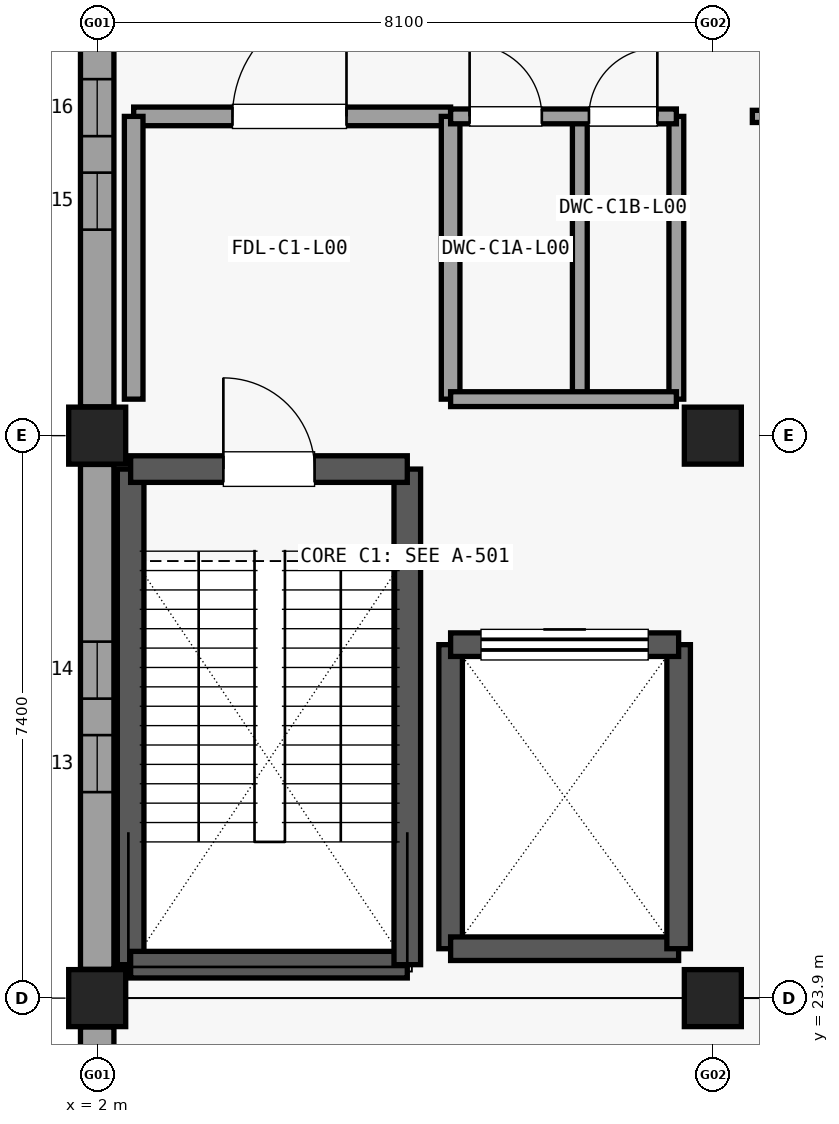
"""IFC4 building model, lengths in metres.
Left out: names, types, materials, properties, quantities, classifications, styles, units other than length and angle.
Written with IfcOpenShell. Run it as: python <this file> out.ifc"""

import sys

from ifc_helpers import new_model, si_unit, direction, frame, frame_2d, origin, origin_2d, place, context, subcontext, project, spatial, rectangle, extrude, element, fill, save


model = new_model("IFC4")
c1 = context("Model", 3, precision=1e-05, world=origin(), true_north=direction((0.0, 1.0)))
c2 = subcontext(c1, "Body", "Model", "MODEL_VIEW")
j1 = project(units=[si_unit("LENGTHUNIT", "METRE"), si_unit("PLANEANGLEUNIT", "RADIAN")], contexts=[c1])
p1 = place(None, origin())
s1 = spatial("IfcSite", under=j1, at=p1, CompositionType="ELEMENT")
p2 = place(p1, origin())
s2 = spatial("IfcBuilding", under=s1, at=p2, CompositionType="ELEMENT")
p3 = place(p2, origin())
s3 = spatial("IfcBuildingStorey", under=s2, at=p3, CompositionType="ELEMENT", Elevation=0.0)
for number, where, z_axis, x_axis in (
    (1, (2.0, 23.9, 0.0), (0.0, 0.0, 1.0), (1.0, 0.0, 0.0)),
    (2, (2.0, 31.3, 0.0), (0.0, 0.0, 1.0), (1.0, 0.0, 0.0)),
    (3, (10.1, 23.9, 0.0), (0.0, 0.0, 1.0), (1.0, 0.0, 0.0)),
    (4, (10.1, 31.3, 0.0), (0.0, 0.0, 1.0), (1.0, 0.0, 0.0)),
):
    element("IfcColumn", number, at=place(p3, frame(where, z_axis=z_axis, x_axis=x_axis)), inside=s3, PredefinedType="COLUMN", context=c2, shape_type="SweptSolid", body=[
        extrude(rectangle(XDim=0.75, YDim=0.75, at=origin_2d()), origin(), (0.0, 0.0, 1.0), 5.135),
    ])
p4 = place(p3, frame((2.0, 16.879, 0.0), z_axis=(0.0, 0.0, 1.0), x_axis=(0.0, 1.0, 0.0)))
e5 = element("IfcWall", 5, at=p4, inside=s3, PredefinedType="SOLIDWALL", context=c2, shape_type="SweptSolid", body=[
    extrude(rectangle(XDim=6.642, YDim=0.44, at=frame_2d((3.321, 0.0))), origin(), (0.0, 0.0, 1.0), 4.27),
])
p5 = place(p4, frame((2.331, 0.0, 0.65)))
e6 = element("IfcOpeningElement", 6, at=p5, cuts=e5, PredefinedType="OPENING", context=c2, shape_type="SweptSolid", body=[
    extrude(rectangle(XDim=0.75, YDim=3.1, at=frame_2d((0.375, 1.55))), frame((0.0, 0.23, 0.0), z_axis=(0.0, -1.0, 0.0), x_axis=(1.0, 0.0, 0.0)), (0.0, 0.0, 1.0), 0.46),
])
p6 = place(p4, frame((3.561, 0.0, 0.65)))
e7 = element("IfcOpeningElement", 7, at=p6, cuts=e5, PredefinedType="OPENING", context=c2, shape_type="SweptSolid", body=[
    extrude(rectangle(XDim=0.75, YDim=3.1, at=frame_2d((0.375, 1.55))), frame((0.0, 0.23, 0.0), z_axis=(0.0, -1.0, 0.0), x_axis=(1.0, 0.0, 0.0)), (0.0, 0.0, 1.0), 0.46),
])
p7 = place(p3, frame((2.0, 24.279, 0.0), z_axis=(0.0, 0.0, 1.0), x_axis=(0.0, 1.0, 0.0)))
e8 = element("IfcWall", 8, at=p7, inside=s3, PredefinedType="SOLIDWALL", context=c2, shape_type="SweptSolid", body=[
    extrude(rectangle(XDim=6.642, YDim=0.44, at=frame_2d((3.321, 0.0))), origin(), (0.0, 0.0, 1.0), 4.27),
])
p8 = place(p7, frame((2.331, 0.0, 0.65)))
e9 = element("IfcOpeningElement", 9, at=p8, cuts=e8, PredefinedType="OPENING", context=c2, shape_type="SweptSolid", body=[
    extrude(rectangle(XDim=0.75, YDim=3.1, at=frame_2d((0.375, 1.55))), frame((0.0, 0.23, 0.0), z_axis=(0.0, -1.0, 0.0), x_axis=(1.0, 0.0, 0.0)), (0.0, 0.0, 1.0), 0.46),
])
p9 = place(p7, frame((3.561, 0.0, 0.65)))
e10 = element("IfcOpeningElement", 10, at=p9, cuts=e8, PredefinedType="OPENING", context=c2, shape_type="SweptSolid", body=[
    extrude(rectangle(XDim=0.75, YDim=3.1, at=frame_2d((0.375, 1.55))), frame((0.0, 0.23, 0.0), z_axis=(0.0, -1.0, 0.0), x_axis=(1.0, 0.0, 0.0)), (0.0, 0.0, 1.0), 0.46),
])
p10 = place(p3, frame((2.0, 31.679, 0.0), z_axis=(0.0, 0.0, 1.0), x_axis=(0.0, 1.0, 0.0)))
e11 = element("IfcWall", 11, at=p10, inside=s3, PredefinedType="SOLIDWALL", context=c2, shape_type="SweptSolid", body=[
    extrude(rectangle(XDim=6.642, YDim=0.44, at=frame_2d((3.321, 0.0))), origin(), (0.0, 0.0, 1.0), 4.27),
])
p11 = place(p10, frame((2.331, 0.0, 0.65)))
e12 = element("IfcOpeningElement", 12, at=p11, cuts=e11, PredefinedType="OPENING", context=c2, shape_type="SweptSolid", body=[
    extrude(rectangle(XDim=0.75, YDim=3.1, at=frame_2d((0.375, 1.55))), frame((0.0, 0.23, 0.0), z_axis=(0.0, -1.0, 0.0), x_axis=(1.0, 0.0, 0.0)), (0.0, 0.0, 1.0), 0.46),
])
p12 = place(p10, frame((3.561, 0.0, 0.65)))
e13 = element("IfcOpeningElement", 13, at=p12, cuts=e11, PredefinedType="OPENING", context=c2, shape_type="SweptSolid", body=[
    extrude(rectangle(XDim=0.75, YDim=3.1, at=frame_2d((0.375, 1.55))), frame((0.0, 0.23, 0.0), z_axis=(0.0, -1.0, 0.0), x_axis=(1.0, 0.0, 0.0)), (0.0, 0.0, 1.0), 0.46),
])
p13 = place(p3, frame((2.44, 24.34, 0.0), z_axis=(0.0, 0.0, 1.0), x_axis=(0.0, 1.0, 0.0)))
e14 = element("IfcWall", 14, at=p13, inside=s3, PredefinedType="SHEAR", context=c2, shape_type="SweptSolid", body=[
    extrude(rectangle(XDim=6.52, YDim=0.35, at=frame_2d((3.26, 0.0))), origin(), (0.0, 0.0, 1.0), 5.13),
])
p14 = place(p3, frame((2.44, 24.34, 0.0), z_axis=(0.0, 0.0, 1.0), x_axis=(1.0, 0.0, 0.0)))
e15 = element("IfcWall", 15, at=p14, inside=s3, PredefinedType="SHEAR", context=c2, shape_type="SweptSolid", body=[
    extrude(rectangle(XDim=3.64, YDim=0.35, at=frame_2d((1.82, 0.0))), origin(), (0.0, 0.0, 1.0), 5.13),
])
p15 = place(p3, frame((6.08, 24.34, 0.0), z_axis=(0.0, 0.0, 1.0), x_axis=(0.0, 1.0, 0.0)))
e16 = element("IfcWall", 16, at=p15, inside=s3, PredefinedType="SHEAR", context=c2, shape_type="SweptSolid", body=[
    extrude(rectangle(XDim=6.52, YDim=0.35, at=frame_2d((3.26, 0.0))), origin(), (0.0, 0.0, 1.0), 5.13),
])
p16 = place(p3, frame((2.44, 30.86, 0.0), z_axis=(0.0, 0.0, 1.0), x_axis=(1.0, 0.0, 0.0)))
e17 = element("IfcWall", 17, at=p16, inside=s3, PredefinedType="SHEAR", context=c2, shape_type="SweptSolid", body=[
    extrude(rectangle(XDim=3.64, YDim=0.35, at=frame_2d((1.82, 0.0))), origin(), (0.0, 0.0, 1.0), 5.13),
])
p17 = place(p16, frame((1.22, 0.0, 0.0)))
e18 = element("IfcOpeningElement", 18, at=p17, cuts=e17, PredefinedType="OPENING", context=c2, shape_type="SweptSolid", body=[
    extrude(rectangle(XDim=1.2, YDim=2.15, at=frame_2d((0.6, 1.075))), frame((0.0, 0.185, 0.0), z_axis=(0.0, -1.0, 0.0), x_axis=(1.0, 0.0, 0.0)), (0.0, 0.0, 1.0), 0.37),
])
p18 = place(p3, frame((6.65, 24.55, 0.0), z_axis=(0.0, 0.0, 1.0), x_axis=(0.0, 1.0, 0.0)))
e19 = element("IfcWall", 19, at=p18, inside=s3, PredefinedType="SHEAR", context=c2, shape_type="SweptSolid", body=[
    extrude(rectangle(XDim=4.0, YDim=0.31, at=frame_2d((2.0, 0.0))), origin(), (0.0, 0.0, 1.0), 5.13),
])
p19 = place(p3, frame((6.65, 24.55, 0.0), z_axis=(0.0, 0.0, 1.0), x_axis=(1.0, 0.0, 0.0)))
e20 = element("IfcWall", 20, at=p19, inside=s3, PredefinedType="SHEAR", context=c2, shape_type="SweptSolid", body=[
    extrude(rectangle(XDim=3.0, YDim=0.31, at=frame_2d((1.5, 0.0))), origin(), (0.0, 0.0, 1.0), 5.13),
])
p20 = place(p3, frame((9.65, 24.55, 0.0), z_axis=(0.0, 0.0, 1.0), x_axis=(0.0, 1.0, 0.0)))
e21 = element("IfcWall", 21, at=p20, inside=s3, PredefinedType="SHEAR", context=c2, shape_type="SweptSolid", body=[
    extrude(rectangle(XDim=4.0, YDim=0.31, at=frame_2d((2.0, 0.0))), origin(), (0.0, 0.0, 1.0), 5.13),
])
p21 = place(p3, frame((6.65, 28.55, 0.0), z_axis=(0.0, 0.0, 1.0), x_axis=(1.0, 0.0, 0.0)))
e22 = element("IfcWall", 22, at=p21, inside=s3, PredefinedType="SHEAR", context=c2, shape_type="SweptSolid", body=[
    extrude(rectangle(XDim=3.0, YDim=0.31, at=frame_2d((1.5, 0.0))), origin(), (0.0, 0.0, 1.0), 5.13),
])
p22 = place(p21, frame((0.4, 0.0, 0.0)))
e23 = element("IfcOpeningElement", 23, at=p22, cuts=e22, PredefinedType="OPENING", context=c2, shape_type="SweptSolid", body=[
    extrude(rectangle(XDim=2.2, YDim=2.55, at=frame_2d((1.1, 1.275))), frame((0.0, 0.165, 0.0), z_axis=(0.0, -1.0, 0.0), x_axis=(1.0, 0.0, 0.0)), (0.0, 0.0, 1.0), 0.33),
])
p23 = place(p3, frame((2.48, 35.5, 0.0), z_axis=(0.0, 0.0, 1.0), x_axis=(1.0, 0.0, 0.0)))
e24 = element("IfcWall", 24, at=p23, inside=s3, PredefinedType="PARTITIONING", context=c2, shape_type="SweptSolid", body=[
    extrude(rectangle(XDim=4.17, YDim=0.245, at=frame_2d((2.085, 0.0))), origin(), (0.0, 0.0, 1.0), 4.275),
])
p24 = place(p23, frame((1.3, 0.0, 0.0)))
e25 = element("IfcOpeningElement", 25, at=p24, cuts=e24, PredefinedType="OPENING", context=c2, shape_type="SweptSolid", body=[
    extrude(rectangle(XDim=1.5, YDim=2.15, at=frame_2d((0.75, 1.075))), frame((0.0, 0.133, 0.0), z_axis=(0.0, -1.0, 0.0), x_axis=(1.0, 0.0, 0.0)), (0.0, 0.0, 1.0), 0.265),
])
for number, where, z_axis, x_axis in (
    (26, (2.48, 31.78, 0.0), (0.0, 0.0, 1.0), (0.0, 1.0, 0.0)),
    (27, (6.65, 31.78, 0.0), (0.0, 0.0, 1.0), (0.0, 1.0, 0.0)),
):
    element("IfcWall", number, at=place(p3, frame(where, z_axis=z_axis, x_axis=x_axis)), inside=s3, PredefinedType="PARTITIONING", context=c2, shape_type="SweptSolid", body=[
        extrude(rectangle(XDim=3.72, YDim=0.245, at=frame_2d((1.86, 0.0))), origin(), (0.0, 0.0, 1.0), 4.275),
    ])
for number, where, z_axis, x_axis in (
    (28, (8.35, 31.78, 0.0), (0.0, 0.0, 1.0), (0.0, 1.0, 0.0)),
    (29, (9.62, 31.78, 0.0), (0.0, 0.0, 1.0), (0.0, 1.0, 0.0)),
):
    element("IfcWall", number, at=place(p3, frame(where, z_axis=z_axis, x_axis=x_axis)), inside=s3, PredefinedType="PARTITIONING", context=c2, shape_type="SweptSolid", body=[
        extrude(rectangle(XDim=3.72, YDim=0.195, at=frame_2d((1.86, 0.0))), origin(), (0.0, 0.0, 1.0), 4.275),
    ])
p25 = place(p3, frame((6.65, 31.78, 0.0), z_axis=(0.0, 0.0, 1.0), x_axis=(1.0, 0.0, 0.0)))
e30 = element("IfcWall", 30, at=p25, inside=s3, PredefinedType="PARTITIONING", context=c2, shape_type="SweptSolid", body=[
    extrude(rectangle(XDim=2.97, YDim=0.195, at=frame_2d((1.485, 0.0))), origin(), (0.0, 0.0, 1.0), 4.275),
])
p26 = place(p3, frame((6.65, 35.5, 0.0), z_axis=(0.0, 0.0, 1.0), x_axis=(1.0, 0.0, 0.0)))
e31 = element("IfcWall", 31, at=p26, inside=s3, PredefinedType="PARTITIONING", context=c2, shape_type="SweptSolid", body=[
    extrude(rectangle(XDim=2.97, YDim=0.195, at=frame_2d((1.485, 0.0))), origin(), (0.0, 0.0, 1.0), 4.275),
])
p27 = place(p26, frame((0.25, 0.0, 0.0)))
e32 = element("IfcOpeningElement", 32, at=p27, cuts=e31, PredefinedType="OPENING", context=c2, shape_type="SweptSolid", body=[
    extrude(rectangle(XDim=0.95, YDim=2.1, at=frame_2d((0.475, 1.05))), frame((0.0, 0.107, 0.0), z_axis=(0.0, -1.0, 0.0), x_axis=(1.0, 0.0, 0.0)), (0.0, 0.0, 1.0), 0.215),
])
p28 = place(p26, frame((1.82, 0.0, 0.0)))
e33 = element("IfcOpeningElement", 33, at=p28, cuts=e31, PredefinedType="OPENING", context=c2, shape_type="SweptSolid", body=[
    extrude(rectangle(XDim=0.9, YDim=2.1, at=frame_2d((0.45, 1.05))), frame((0.0, 0.107, 0.0), z_axis=(0.0, -1.0, 0.0), x_axis=(1.0, 0.0, 0.0)), (0.0, 0.0, 1.0), 0.215),
])
p29 = place(p3, frame((10.62, 35.5, 0.0), z_axis=(0.0, 0.0, 1.0), x_axis=(1.0, 0.0, 0.0)))
e34 = element("IfcWall", 34, at=p29, inside=s3, PredefinedType="PARTITIONING", context=c2, shape_type="SweptSolid", body=[
    extrude(rectangle(XDim=7.06, YDim=0.16, at=frame_2d((3.53, 0.0))), origin(), (0.0, 0.0, 1.0), 4.275),
])
p30 = place(p29, frame((2.855, 0.0, 0.0)))
e35 = element("IfcOpeningElement", 35, at=p30, cuts=e34, PredefinedType="OPENING", context=c2, shape_type="SweptSolid", body=[
    extrude(rectangle(XDim=1.35, YDim=2.2, at=frame_2d((0.675, 1.1))), frame((0.0, 0.09, 0.0), z_axis=(0.0, -1.0, 0.0), x_axis=(1.0, 0.0, 0.0)), (0.0, 0.0, 1.0), 0.18),
])
p31 = place(p8, origin())
e36 = element("IfcWindow", 36, at=p31, inside=s3, PartitioningType="SINGLE_PANEL", PredefinedType="WINDOW", context=c2, shape_type="SweptSolid", body=[
    extrude(rectangle(XDim=0.75, YDim=3.1, at=frame_2d((0.375, 1.55))), frame((0.0, 0.03, 0.0), z_axis=(0.0, -1.0, 0.0), x_axis=(1.0, 0.0, 0.0)), (0.0, 0.0, 1.0), 0.06),
])
fill(e9, e36)
p32 = place(p9, origin())
e37 = element("IfcWindow", 37, at=p32, inside=s3, PartitioningType="SINGLE_PANEL", PredefinedType="WINDOW", context=c2, shape_type="SweptSolid", body=[
    extrude(rectangle(XDim=0.75, YDim=3.1, at=frame_2d((0.375, 1.55))), frame((0.0, 0.03, 0.0), z_axis=(0.0, -1.0, 0.0), x_axis=(1.0, 0.0, 0.0)), (0.0, 0.0, 1.0), 0.06),
])
fill(e10, e37)
p33 = place(p11, origin())
e38 = element("IfcWindow", 38, at=p33, inside=s3, PartitioningType="SINGLE_PANEL", PredefinedType="WINDOW", context=c2, shape_type="SweptSolid", body=[
    extrude(rectangle(XDim=0.75, YDim=3.1, at=frame_2d((0.375, 1.55))), frame((0.0, 0.03, 0.0), z_axis=(0.0, -1.0, 0.0), x_axis=(1.0, 0.0, 0.0)), (0.0, 0.0, 1.0), 0.06),
])
fill(e12, e38)
p34 = place(p12, origin())
e39 = element("IfcWindow", 39, at=p34, inside=s3, PartitioningType="SINGLE_PANEL", PredefinedType="WINDOW", context=c2, shape_type="SweptSolid", body=[
    extrude(rectangle(XDim=0.75, YDim=3.1, at=frame_2d((0.375, 1.55))), frame((0.0, 0.03, 0.0), z_axis=(0.0, -1.0, 0.0), x_axis=(1.0, 0.0, 0.0)), (0.0, 0.0, 1.0), 0.06),
])
fill(e13, e39)
p35 = place(p17, origin())
e40 = element("IfcDoor", 40, at=p35, inside=s3, OperationType="SINGLE_SWING_LEFT", PredefinedType="DOOR", context=c2, shape_type="SweptSolid", body=[
    extrude(rectangle(XDim=1.2, YDim=2.15, at=frame_2d((0.6, 1.075))), frame((0.0, 0.025, 0.0), z_axis=(0.0, -1.0, 0.0), x_axis=(1.0, 0.0, 0.0)), (0.0, 0.0, 1.0), 0.05),
])
fill(e18, e40)
p36 = place(p22, origin())
e41 = element("IfcDoor", 41, at=p36, inside=s3, OperationType="SLIDING_TO_RIGHT", PredefinedType="DOOR", context=c2, shape_type="SweptSolid", body=[
    extrude(rectangle(XDim=2.2, YDim=2.55, at=frame_2d((1.1, 1.275))), frame((0.0, 0.025, 0.0), z_axis=(0.0, -1.0, 0.0), x_axis=(1.0, 0.0, 0.0)), (0.0, 0.0, 1.0), 0.05),
])
fill(e23, e41)
p37 = place(p24, origin())
e42 = element("IfcDoor", 42, at=p37, inside=s3, OperationType="SINGLE_SWING_RIGHT", PredefinedType="DOOR", context=c2, shape_type="SweptSolid", body=[
    extrude(rectangle(XDim=1.5, YDim=2.15, at=frame_2d((0.75, 1.075))), frame((0.0, 0.025, 0.0), z_axis=(0.0, -1.0, 0.0), x_axis=(1.0, 0.0, 0.0)), (0.0, 0.0, 1.0), 0.05),
])
fill(e25, e42)
p38 = place(p27, origin())
e43 = element("IfcDoor", 43, at=p38, inside=s3, OperationType="SINGLE_SWING_LEFT", PredefinedType="DOOR", context=c2, shape_type="SweptSolid", body=[
    extrude(rectangle(XDim=0.95, YDim=2.1, at=frame_2d((0.475, 1.05))), frame((0.0, 0.025, 0.0), z_axis=(0.0, -1.0, 0.0), x_axis=(1.0, 0.0, 0.0)), (0.0, 0.0, 1.0), 0.05),
])
fill(e32, e43)
p39 = place(p28, origin())
e44 = element("IfcDoor", 44, at=p39, inside=s3, OperationType="SINGLE_SWING_RIGHT", PredefinedType="DOOR", context=c2, shape_type="SweptSolid", body=[
    extrude(rectangle(XDim=0.9, YDim=2.1, at=frame_2d((0.45, 1.05))), frame((0.0, 0.025, 0.0), z_axis=(0.0, -1.0, 0.0), x_axis=(1.0, 0.0, 0.0)), (0.0, 0.0, 1.0), 0.05),
])
fill(e33, e44)
save(model, sys.argv[1])
